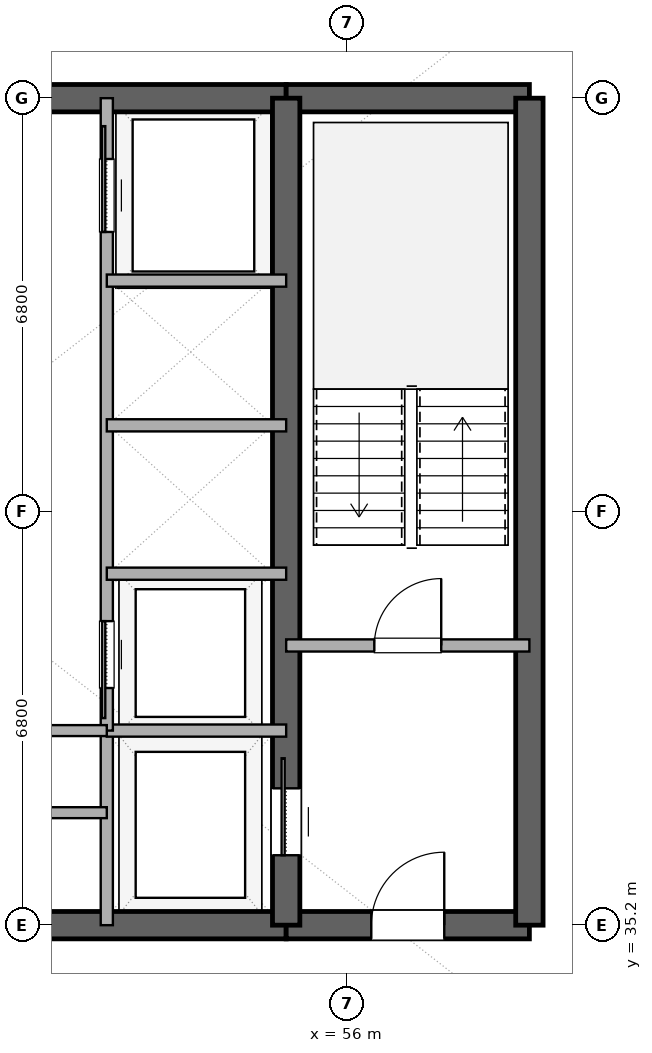
"""IFC4 building model, lengths in metres.
Left out: names, types, materials, properties, quantities, classifications, styles, units other than length and angle.
Written with IfcOpenShell. Run it as: python <this file> out.ifc"""

import sys

from ifc_helpers import new_model, si_unit, direction, frame, frame_2d, origin, place, context, subcontext, project, spatial, rectangle, extrude, element, fill, save


model = new_model("IFC4")
c1 = context("Model", 3, precision=1e-05, world=origin(), true_north=direction((0.0, 1.0)))
c2 = subcontext(c1, "Body", "Model", "MODEL_VIEW")
j1 = project(units=[si_unit("LENGTHUNIT", "METRE"), si_unit("PLANEANGLEUNIT", "RADIAN")], contexts=[c1])
p1 = place(None, origin())
s1 = spatial("IfcSite", under=j1, at=p1, CompositionType="ELEMENT")
p2 = place(p1, origin())
s2 = spatial("IfcBuilding", under=s1, at=p2, CompositionType="ELEMENT")
p3 = place(p2, frame((0.0, 0.0, 157.8)))
s3 = spatial("IfcBuildingStorey", under=s2, at=p3, CompositionType="ELEMENT", Elevation=157.8)
p4 = place(p3, frame((41.0, 35.2, 0.0), z_axis=(0.0, 0.0, 1.0), x_axis=(1.0, 0.0, 0.0)))
e1 = element("IfcWall", 1, at=p4, inside=s3, PredefinedType="SHEAR", context=c2, shape_type="SweptSolid", body=[
    extrude(rectangle(XDim=14.0, YDim=0.45, at=frame_2d((7.0, 0.0))), origin(), (0.0, 0.0, 1.0), 3.38),
])
p5 = place(p4, frame((6.1, 0.0, 0.0)))
e2 = element("IfcOpeningElement", 2, at=p5, cuts=e1, PredefinedType="OPENING", context=c2, shape_type="SweptSolid", body=[
    extrude(rectangle(XDim=1.8, YDim=2.25, at=frame_2d((0.9, 1.125))), frame((0.0, 0.235, 0.0), z_axis=(0.0, -1.0, 0.0), x_axis=(1.0, 0.0, 0.0)), (0.0, 0.0, 1.0), 0.47),
])
p6 = place(p3, frame((55.0, 35.2, 0.0), z_axis=(0.0, 0.0, 1.0), x_axis=(1.0, 0.0, 0.0)))
e3 = element("IfcWall", 3, at=p6, inside=s3, PredefinedType="SHEAR", context=c2, shape_type="SweptSolid", body=[
    extrude(rectangle(XDim=4.0, YDim=0.45, at=frame_2d((2.0, 0.0))), origin(), (0.0, 0.0, 1.0), 3.38),
])
p7 = place(p6, frame((1.4, 0.0, 0.0)))
e4 = element("IfcOpeningElement", 4, at=p7, cuts=e3, PredefinedType="OPENING", context=c2, shape_type="SweptSolid", body=[
    extrude(rectangle(XDim=1.2, YDim=2.15, at=frame_2d((0.6, 1.075))), frame((0.0, 0.235, 0.0), z_axis=(0.0, -1.0, 0.0), x_axis=(1.0, 0.0, 0.0)), (0.0, 0.0, 1.0), 0.47),
])
p8 = place(p3, frame((41.0, 48.8, 0.0), z_axis=(0.0, 0.0, 1.0), x_axis=(1.0, 0.0, 0.0)))
e5 = element("IfcWall", 5, at=p8, inside=s3, PredefinedType="SHEAR", context=c2, shape_type="SweptSolid", body=[
    extrude(rectangle(XDim=14.0, YDim=0.45, at=frame_2d((7.0, 0.0))), origin(), (0.0, 0.0, 1.0), 3.38),
])
p9 = place(p8, frame((6.1, 0.0, 0.0)))
e6 = element("IfcOpeningElement", 6, at=p9, cuts=e5, PredefinedType="OPENING", context=c2, shape_type="SweptSolid", body=[
    extrude(rectangle(XDim=1.8, YDim=2.25, at=frame_2d((0.9, 1.125))), frame((0.0, 0.235, 0.0), z_axis=(0.0, -1.0, 0.0), x_axis=(1.0, 0.0, 0.0)), (0.0, 0.0, 1.0), 0.47),
])
p10 = place(p3, frame((55.0, 48.8, 0.0), z_axis=(0.0, 0.0, 1.0), x_axis=(1.0, 0.0, 0.0)))
e7 = element("IfcWall", 7, at=p10, inside=s3, PredefinedType="SHEAR", context=c2, shape_type="SweptSolid", body=[
    extrude(rectangle(XDim=4.0, YDim=0.45, at=frame_2d((2.0, 0.0))), origin(), (0.0, 0.0, 1.0), 3.38),
])
p11 = place(p3, frame((59.0, 35.2, 0.0), z_axis=(0.0, 0.0, 1.0), x_axis=(0.0, 1.0, 0.0)))
e8 = element("IfcWall", 8, at=p11, inside=s3, PredefinedType="SHEAR", context=c2, shape_type="SweptSolid", body=[
    extrude(rectangle(XDim=13.6, YDim=0.45, at=frame_2d((6.8, 0.0))), origin(), (0.0, 0.0, 1.0), 3.38),
])
p12 = place(p3, frame((55.0, 35.2, 0.0), z_axis=(0.0, 0.0, 1.0), x_axis=(0.0, 1.0, 0.0)))
e9 = element("IfcWall", 9, at=p12, inside=s3, PredefinedType="SHEAR", context=c2, shape_type="SweptSolid", body=[
    extrude(rectangle(XDim=13.6, YDim=0.45, at=frame_2d((6.8, 0.0))), origin(), (0.0, 0.0, 1.0), 3.38),
])
p13 = place(p12, frame((1.15, 0.0, 0.0)))
e10 = element("IfcOpeningElement", 10, at=p13, cuts=e9, PredefinedType="OPENING", context=c2, shape_type="SweptSolid", body=[
    extrude(rectangle(XDim=1.1, YDim=2.2, at=frame_2d((0.55, 1.1))), frame((0.0, 0.235, 0.0), z_axis=(0.0, -1.0, 0.0), x_axis=(1.0, 0.0, 0.0)), (0.0, 0.0, 1.0), 0.47),
])
p14 = place(p3, frame((55.0, 39.8, 0.0), z_axis=(0.0, 0.0, 1.0), x_axis=(1.0, 0.0, 0.0)))
e11 = element("IfcWall", 11, at=p14, inside=s3, PredefinedType="SOLIDWALL", context=c2, shape_type="SweptSolid", body=[
    extrude(rectangle(XDim=4.0, YDim=0.2, at=frame_2d((2.0, 0.0))), origin(), (0.0, 0.0, 1.0), 2.74),
])
p15 = place(p14, frame((1.45, 0.0, 0.0)))
e12 = element("IfcOpeningElement", 12, at=p15, cuts=e11, PredefinedType="OPENING", context=c2, shape_type="SweptSolid", body=[
    extrude(rectangle(XDim=1.1, YDim=2.15, at=frame_2d((0.55, 1.075))), frame((0.0, 0.11, 0.0), z_axis=(0.0, -1.0, 0.0), x_axis=(1.0, 0.0, 0.0)), (0.0, 0.0, 1.0), 0.22),
])
p16 = place(p3, frame((52.05, 35.2, 0.0), z_axis=(0.0, 0.0, 1.0), x_axis=(0.0, 1.0, 0.0)))
e13 = element("IfcWall", 13, at=p16, inside=s3, PredefinedType="SOLIDWALL", context=c2, shape_type="SweptSolid", body=[
    extrude(rectangle(XDim=3.2, YDim=0.2, at=frame_2d((1.6, 0.0))), origin(), (0.0, 0.0, 1.0), 2.74),
])
p17 = place(p3, frame((52.05, 38.4, 0.0), z_axis=(0.0, 0.0, 1.0), x_axis=(1.0, 0.0, 0.0)))
e14 = element("IfcWall", 14, at=p17, inside=s3, PredefinedType="SOLIDWALL", context=c2, shape_type="SweptSolid", body=[
    extrude(rectangle(XDim=2.95, YDim=0.2, at=frame_2d((1.475, 0.0))), origin(), (0.0, 0.0, 1.0), 2.74),
])
p18 = place(p3, frame((52.05, 38.4, 0.0), z_axis=(0.0, 0.0, 1.0), x_axis=(0.0, 1.0, 0.0)))
e15 = element("IfcWall", 15, at=p18, inside=s3, PredefinedType="SOLIDWALL", context=c2, shape_type="SweptSolid", body=[
    extrude(rectangle(XDim=10.4, YDim=0.2, at=frame_2d((5.2, 0.0))), origin(), (0.0, 0.0, 1.0), 2.74),
])
p19 = place(p18, frame((0.7, 0.0, 0.0)))
e16 = element("IfcOpeningElement", 16, at=p19, cuts=e15, PredefinedType="OPENING", context=c2, shape_type="SweptSolid", body=[
    extrude(rectangle(XDim=1.1, YDim=2.2, at=frame_2d((0.55, 1.1))), frame((0.0, 0.11, 0.0), z_axis=(0.0, -1.0, 0.0), x_axis=(1.0, 0.0, 0.0)), (0.0, 0.0, 1.0), 0.22),
])
p20 = place(p18, frame((8.2, 0.0, 0.0)))
e17 = element("IfcOpeningElement", 17, at=p20, cuts=e15, PredefinedType="OPENING", context=c2, shape_type="SweptSolid", body=[
    extrude(rectangle(XDim=1.2, YDim=2.2, at=frame_2d((0.6, 1.1))), frame((0.0, 0.11, 0.0), z_axis=(0.0, -1.0, 0.0), x_axis=(1.0, 0.0, 0.0)), (0.0, 0.0, 1.0), 0.22),
])
for number, where, z_axis, x_axis in (
    (18, (52.05, 40.98, 0.0), (0.0, 0.0, 1.0), (1.0, 0.0, 0.0)),
    (19, (52.05, 43.42, 0.0), (0.0, 0.0, 1.0), (1.0, 0.0, 0.0)),
    (20, (52.05, 45.8, 0.0), (0.0, 0.0, 1.0), (1.0, 0.0, 0.0)),
):
    element("IfcWall", number, at=place(p3, frame(where, z_axis=z_axis, x_axis=x_axis)), inside=s3, PredefinedType="SOLIDWALL", context=c2, shape_type="SweptSolid", body=[
        extrude(rectangle(XDim=2.95, YDim=0.2, at=frame_2d((1.475, 0.0))), origin(), (0.0, 0.0, 1.0), 2.74),
    ])
for number, where, z_axis, x_axis in (
    (21, (49.2, 37.05, 0.0), (0.0, 0.0, 1.0), (1.0, 0.0, 0.0)),
    (22, (49.2, 38.4, 0.0), (0.0, 0.0, 1.0), (1.0, 0.0, 0.0)),
):
    element("IfcWall", number, at=place(p3, frame(where, z_axis=z_axis, x_axis=x_axis)), inside=s3, PredefinedType="PLUMBINGWALL", context=c2, shape_type="SweptSolid", body=[
        extrude(rectangle(XDim=2.85, YDim=0.18, at=frame_2d((1.425, 0.0))), origin(), (0.0, 0.0, 1.0), 2.74),
    ])
p21 = place(p13, origin())
e23 = element("IfcDoor", 23, at=p21, inside=s3, OperationType="SLIDING_TO_RIGHT", PredefinedType="DOOR", context=c2, shape_type="SweptSolid", body=[
    extrude(rectangle(XDim=1.1, YDim=2.2, at=frame_2d((0.55, 1.1))), frame((0.0, 0.025, 0.0), z_axis=(0.0, -1.0, 0.0), x_axis=(1.0, 0.0, 0.0)), (0.0, 0.0, 1.0), 0.05),
])
fill(e10, e23)
p22 = place(p7, origin())
e24 = element("IfcDoor", 24, at=p22, inside=s3, OperationType="SINGLE_SWING_RIGHT", PredefinedType="DOOR", context=c2, shape_type="SweptSolid", body=[
    extrude(rectangle(XDim=1.2, YDim=2.15, at=frame_2d((0.6, 1.075))), frame((0.0, 0.025, 0.0), z_axis=(0.0, -1.0, 0.0), x_axis=(1.0, 0.0, 0.0)), (0.0, 0.0, 1.0), 0.05),
])
fill(e4, e24)
p23 = place(p15, origin())
e25 = element("IfcDoor", 25, at=p23, inside=s3, OperationType="SINGLE_SWING_RIGHT", PredefinedType="DOOR", context=c2, shape_type="SweptSolid", body=[
    extrude(rectangle(XDim=1.1, YDim=2.15, at=frame_2d((0.55, 1.075))), frame((0.0, 0.025, 0.0), z_axis=(0.0, -1.0, 0.0), x_axis=(1.0, 0.0, 0.0)), (0.0, 0.0, 1.0), 0.05),
])
fill(e12, e25)
p24 = place(p19, origin())
e26 = element("IfcDoor", 26, at=p24, inside=s3, OperationType="SLIDING_TO_LEFT", PredefinedType="DOOR", context=c2, shape_type="SweptSolid", body=[
    extrude(rectangle(XDim=1.1, YDim=2.2, at=frame_2d((0.55, 1.1))), frame((0.0, 0.025, 0.0), z_axis=(0.0, -1.0, 0.0), x_axis=(1.0, 0.0, 0.0)), (0.0, 0.0, 1.0), 0.05),
])
fill(e16, e26)
p25 = place(p20, origin())
e27 = element("IfcDoor", 27, at=p25, inside=s3, OperationType="SLIDING_TO_RIGHT", PredefinedType="DOOR", context=c2, shape_type="SweptSolid", body=[
    extrude(rectangle(XDim=1.2, YDim=2.2, at=frame_2d((0.6, 1.1))), frame((0.0, 0.025, 0.0), z_axis=(0.0, -1.0, 0.0), x_axis=(1.0, 0.0, 0.0)), (0.0, 0.0, 1.0), 0.05),
])
fill(e17, e27)
save(model, sys.argv[1])
